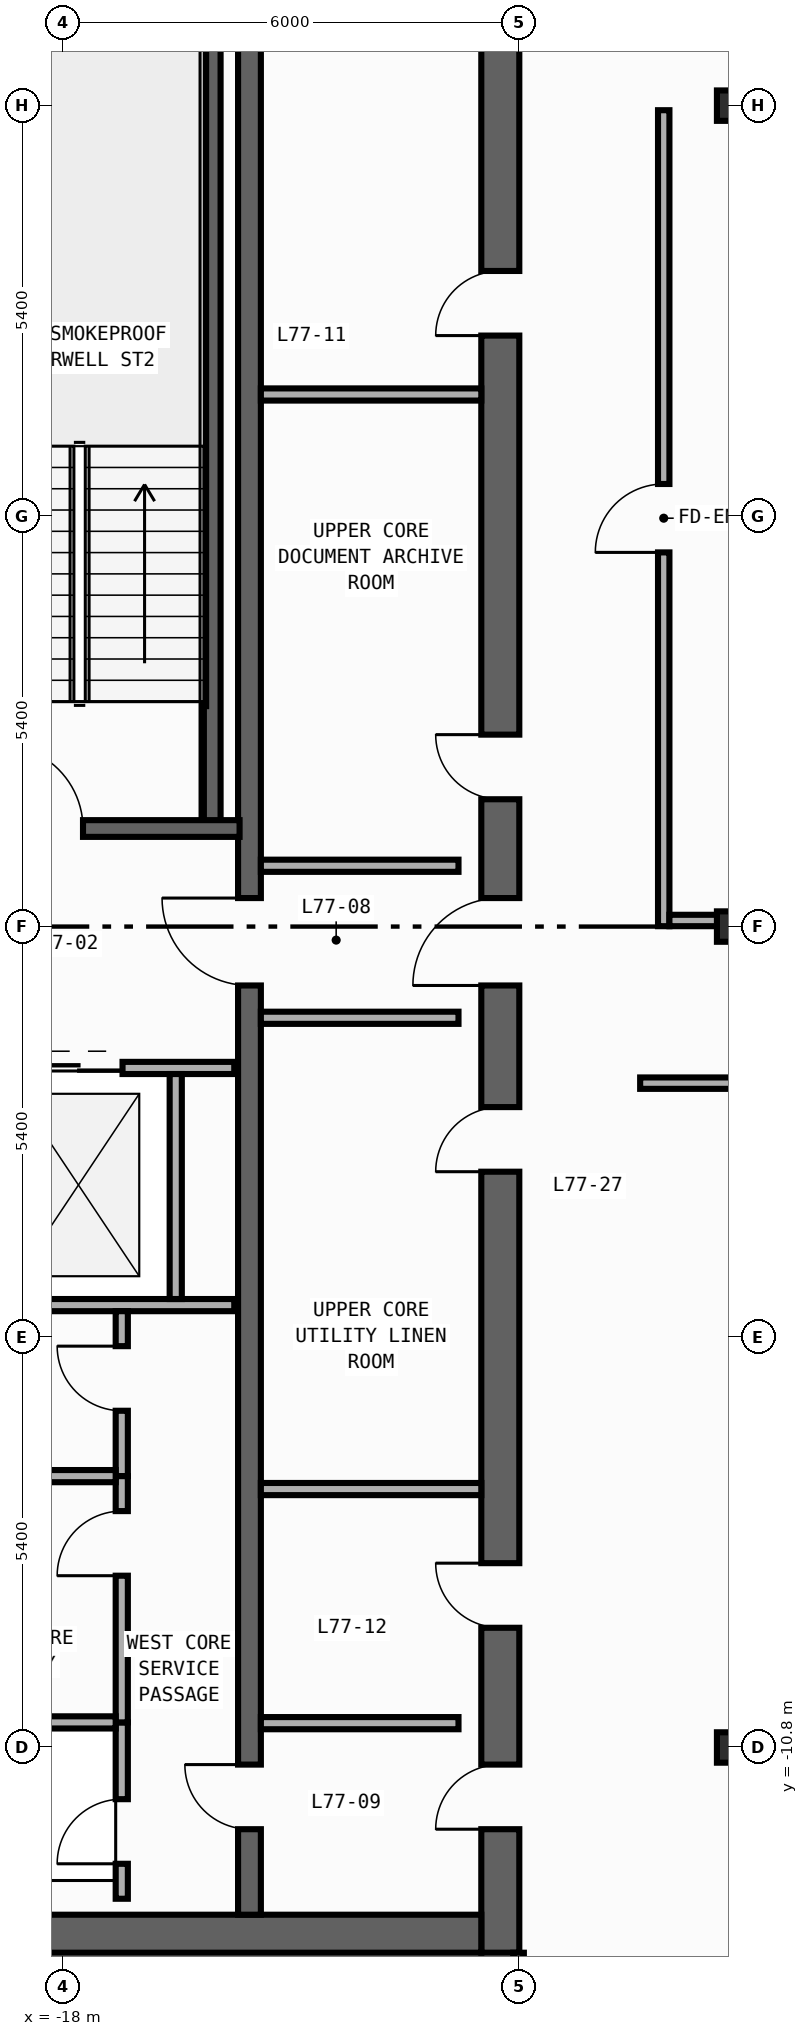
"""IFC4 building model, lengths in metres.
Left out: names, types, materials, properties, quantities, classifications, styles, units other than length and angle.
Written with IfcOpenShell. Run it as: python <this file> out.ifc"""

import sys

from ifc_helpers import new_model, si_unit, direction, frame, frame_2d, origin, origin_2d, place, context, subcontext, project, spatial, rectangle, i_section, extrude, element, fill, save


model = new_model("IFC4")
c1 = context("Model", 3, precision=1e-05, world=origin(), true_north=direction((0.0, 1.0)))
c2 = subcontext(c1, "Body", "Model", "MODEL_VIEW")
j1 = project(units=[si_unit("LENGTHUNIT", "METRE"), si_unit("PLANEANGLEUNIT", "RADIAN")], contexts=[c1])
p1 = place(None, origin())
s1 = spatial("IfcSite", under=j1, at=p1, CompositionType="ELEMENT")
p2 = place(p1, origin())
s2 = spatial("IfcBuilding", under=s1, at=p2, CompositionType="ELEMENT")
p3 = place(p2, frame((0.0, 0.0, 320.4)))
s3 = spatial("IfcBuildingStorey", under=s2, at=p3, CompositionType="ELEMENT", Elevation=320.4)
p4 = place(p3, frame((-12.25, -13.5, 0.0), z_axis=(0.0, 0.0, 1.0), x_axis=(0.0, 1.0, 0.0)))
e1 = element("IfcWall", 1, at=p4, inside=s3, PredefinedType="SHEAR", context=c2, shape_type="SweptSolid", body=[
    extrude(rectangle(XDim=27.0, YDim=0.5, at=frame_2d((13.5, 0.0))), origin(), (0.0, 0.0, 1.0), 4.45),
])
p5 = place(p4, frame((15.175, 0.0, 0.0)))
e2 = element("IfcOpeningElement", 2, at=p5, cuts=e1, PredefinedType="OPENING", context=c2, shape_type="SweptSolid", body=[
    extrude(rectangle(XDim=0.85, YDim=2.1, at=frame_2d((0.425, 1.05))), frame((0.0, 0.26, 0.0), z_axis=(0.0, -1.0, 0.0), x_axis=(1.0, 0.0, 0.0)), (0.0, 0.0, 1.0), 0.52),
])
p6 = place(p4, frame((21.275, 0.0, 0.0)))
e3 = element("IfcOpeningElement", 3, at=p6, cuts=e1, PredefinedType="OPENING", context=c2, shape_type="SweptSolid", body=[
    extrude(rectangle(XDim=0.85, YDim=2.1, at=frame_2d((0.425, 1.05))), frame((0.0, 0.26, 0.0), z_axis=(0.0, -1.0, 0.0), x_axis=(1.0, 0.0, 0.0)), (0.0, 0.0, 1.0), 0.52),
])
p7 = place(p4, frame((4.275, 0.0, 0.0)))
e4 = element("IfcOpeningElement", 4, at=p7, cuts=e1, PredefinedType="OPENING", context=c2, shape_type="SweptSolid", body=[
    extrude(rectangle(XDim=0.85, YDim=2.1, at=frame_2d((0.425, 1.05))), frame((0.0, 0.26, 0.0), z_axis=(0.0, -1.0, 0.0), x_axis=(1.0, 0.0, 0.0)), (0.0, 0.0, 1.0), 0.52),
])
p8 = place(p4, frame((10.275, 0.0, 0.0)))
e5 = element("IfcOpeningElement", 5, at=p8, cuts=e1, PredefinedType="OPENING", context=c2, shape_type="SweptSolid", body=[
    extrude(rectangle(XDim=0.85, YDim=2.1, at=frame_2d((0.425, 1.05))), frame((0.0, 0.26, 0.0), z_axis=(0.0, -1.0, 0.0), x_axis=(1.0, 0.0, 0.0)), (0.0, 0.0, 1.0), 0.52),
])
p9 = place(p4, frame((12.725, 0.0, 0.0)))
e6 = element("IfcOpeningElement", 6, at=p9, cuts=e1, PredefinedType="OPENING", context=c2, shape_type="SweptSolid", body=[
    extrude(rectangle(XDim=1.15, YDim=2.2, at=frame_2d((0.575, 1.1))), frame((0.0, 0.26, 0.0), z_axis=(0.0, -1.0, 0.0), x_axis=(1.0, 0.0, 0.0)), (0.0, 0.0, 1.0), 0.52),
])
p10 = place(p4, frame((1.625, 0.0, 0.0)))
e7 = element("IfcOpeningElement", 7, at=p10, cuts=e1, PredefinedType="OPENING", context=c2, shape_type="SweptSolid", body=[
    extrude(rectangle(XDim=0.85, YDim=2.1, at=frame_2d((0.425, 1.05))), frame((0.0, 0.26, 0.0), z_axis=(0.0, -1.0, 0.0), x_axis=(1.0, 0.0, 0.0)), (0.0, 0.0, 1.0), 0.52),
])
p11 = place(p3, frame((-19.9, -13.25, 0.0), z_axis=(0.0, 0.0, 1.0), x_axis=(1.0, 0.0, 0.0)))
e8 = element("IfcWall", 8, at=p11, inside=s3, PredefinedType="SHEAR", context=c2, shape_type="SweptSolid", body=[
    extrude(rectangle(XDim=7.4, YDim=0.5, at=frame_2d((3.7, 0.0))), origin(), (0.0, 0.0, 1.0), 4.45),
])
p12 = place(p3, frame((-15.55, -13.0, 0.0), z_axis=(0.0, 0.0, 1.0), x_axis=(0.0, 1.0, 0.0)))
e9 = element("IfcWall", 9, at=p12, inside=s3, PredefinedType="SHEAR", context=c2, shape_type="SweptSolid", body=[
    extrude(rectangle(XDim=26.0, YDim=0.3, at=frame_2d((13.0, 0.0))), origin(), (0.0, 0.0, 1.0), 4.45),
])
p13 = place(p12, frame((12.225, 0.0, 0.0)))
e10 = element("IfcOpeningElement", 10, at=p13, cuts=e9, PredefinedType="OPENING", context=c2, shape_type="SweptSolid", body=[
    extrude(rectangle(XDim=1.15, YDim=2.2, at=frame_2d((0.575, 1.1))), frame((0.0, 0.16, 0.0), z_axis=(0.0, -1.0, 0.0), x_axis=(1.0, 0.0, 0.0)), (0.0, 0.0, 1.0), 0.32),
])
p14 = place(p12, frame((1.125, 0.0, 0.0)))
e11 = element("IfcOpeningElement", 11, at=p14, cuts=e9, PredefinedType="OPENING", context=c2, shape_type="SweptSolid", body=[
    extrude(rectangle(XDim=0.85, YDim=2.1, at=frame_2d((0.425, 1.05))), frame((0.0, 0.16, 0.0), z_axis=(0.0, -1.0, 0.0), x_axis=(1.0, 0.0, 0.0)), (0.0, 0.0, 1.0), 0.32),
])
p15 = place(p3, frame((-16.04, 1.29, 0.0), z_axis=(0.0, 0.0, 1.0), x_axis=(0.0, 1.0, 0.0)))
e12 = element("IfcWall", 12, at=p15, inside=s3, PredefinedType="SHEAR", context=c2, shape_type="SweptSolid", body=[
    extrude(rectangle(XDim=11.42, YDim=0.22, at=frame_2d((5.71, 0.0))), origin(), (0.0, 0.0, 1.0), 4.45),
])
p16 = place(p3, frame((-19.92, 1.29, 0.0), z_axis=(0.0, 0.0, 1.0), x_axis=(1.0, 0.0, 0.0)))
e13 = element("IfcWall", 13, at=p16, inside=s3, PredefinedType="SHEAR", context=c2, shape_type="SweptSolid", body=[
    extrude(rectangle(XDim=4.24, YDim=0.22, at=frame_2d((2.12, 0.0))), origin(), (0.0, 0.0, 1.0), 4.45),
])
p17 = place(p16, frame((1.08, 0.0, 0.0)))
e14 = element("IfcOpeningElement", 14, at=p17, cuts=e13, PredefinedType="OPENING", context=c2, shape_type="SweptSolid", body=[
    extrude(rectangle(XDim=1.1, YDim=2.2, at=frame_2d((0.55, 1.1))), frame((0.0, 0.12, 0.0), z_axis=(0.0, -1.0, 0.0), x_axis=(1.0, 0.0, 0.0)), (0.0, 0.0, 1.0), 0.24),
])
for number, where, z_axis, x_axis in (
    (15, (-9.2, -10.8, 0.0), (0.0, 0.0, 1.0), (1.0, 0.0, 0.0)),
    (16, (-9.2, 0.0, 0.0), (0.0, 0.0, 1.0), (1.0, 0.0, 0.0)),
    (17, (-9.2, 10.8, 0.0), (0.0, 0.0, 1.0), (1.0, 0.0, 0.0)),
):
    element("IfcColumn", number, at=place(p3, frame(where, z_axis=z_axis, x_axis=x_axis)), inside=s3, PredefinedType="COLUMN", context=c2, shape_type="SweptSolid", body=[
        extrude(i_section(OverallWidth=0.4, OverallDepth=0.4, WebThickness=0.013, FlangeThickness=0.021, FilletRadius=0.022, at=origin_2d()), origin(), (0.0, 0.0, 1.0), 4.8),
    ])
p18 = place(p3, frame((-19.55, -1.86, 0.0), z_axis=(0.0, 0.0, 1.0), x_axis=(1.0, 0.0, 0.0)))
e18 = element("IfcWall", 18, at=p18, inside=s3, PredefinedType="STANDARD", context=c2, shape_type="SweptSolid", body=[
    extrude(rectangle(XDim=3.8, YDim=0.16, at=frame_2d((1.9, 0.0))), origin(), (0.0, 0.0, 1.0), 4.45),
])
p19 = place(p18, frame((1.18, 0.0, 0.0)))
e19 = element("IfcOpeningElement", 19, at=p19, cuts=e18, PredefinedType="OPENING", context=c2, shape_type="SweptSolid", body=[
    extrude(rectangle(XDim=1.15, YDim=2.2, at=frame_2d((0.575, 1.1))), frame((0.0, 0.09, 0.0), z_axis=(0.0, -1.0, 0.0), x_axis=(1.0, 0.0, 0.0)), (0.0, 0.0, 1.0), 0.18),
])
p20 = place(p3, frame((-19.55, -4.98, 0.0), z_axis=(0.0, 0.0, 1.0), x_axis=(1.0, 0.0, 0.0)))
e20 = element("IfcWall", 20, at=p20, inside=s3, PredefinedType="STANDARD", context=c2, shape_type="SweptSolid", body=[
    extrude(rectangle(XDim=3.8, YDim=0.16, at=frame_2d((1.9, 0.0))), origin(), (0.0, 0.0, 1.0), 4.45),
])
p21 = place(p3, frame((-16.52, -4.9, 0.0), z_axis=(0.0, 0.0, 1.0), x_axis=(0.0, 1.0, 0.0)))
e21 = element("IfcWall", 21, at=p21, inside=s3, PredefinedType="STANDARD", context=c2, shape_type="SweptSolid", body=[
    extrude(rectangle(XDim=2.96, YDim=0.16, at=frame_2d((1.48, 0.0))), origin(), (0.0, 0.0, 1.0), 4.45),
])
for number, where, z_axis, x_axis in (
    (22, (-15.4, 0.8, 0.0), (0.0, 0.0, 1.0), (1.0, 0.0, 0.0)),
    (23, (-15.4, -1.2, 0.0), (0.0, 0.0, 1.0), (1.0, 0.0, 0.0)),
    (24, (-15.4, -10.48, 0.0), (0.0, 0.0, 1.0), (1.0, 0.0, 0.0)),
):
    element("IfcWall", number, at=place(p3, frame(where, z_axis=z_axis, x_axis=x_axis)), inside=s3, PredefinedType="STANDARD", context=c2, shape_type="SweptSolid", body=[
        extrude(rectangle(XDim=2.6, YDim=0.16, at=frame_2d((1.3, 0.0))), origin(), (0.0, 0.0, 1.0), 4.45),
    ])
p22 = place(p3, frame((-17.23, -12.79, 0.0), z_axis=(0.0, 0.0, 1.0), x_axis=(0.0, 1.0, 0.0)))
e25 = element("IfcWall", 25, at=p22, inside=s3, PredefinedType="PARTITIONING", context=c2, shape_type="SweptSolid", body=[
    extrude(rectangle(XDim=2.32, YDim=0.16, at=frame_2d((1.16, 0.0))), origin(), (0.0, 0.0, 1.0), 4.45),
])
p23 = place(p22, frame((0.46, 0.0, 0.0)))
e26 = element("IfcOpeningElement", 26, at=p23, cuts=e25, PredefinedType="OPENING", context=c2, shape_type="SweptSolid", body=[
    extrude(rectangle(XDim=0.85, YDim=2.1, at=frame_2d((0.425, 1.05))), frame((0.0, 0.09, 0.0), z_axis=(0.0, -1.0, 0.0), x_axis=(1.0, 0.0, 0.0)), (0.0, 0.0, 1.0), 0.18),
])
p24 = place(p3, frame((-17.23, -7.23, 0.0), z_axis=(0.0, 0.0, 1.0), x_axis=(0.0, 1.0, 0.0)))
e27 = element("IfcWall", 27, at=p24, inside=s3, PredefinedType="PARTITIONING", context=c2, shape_type="SweptSolid", body=[
    extrude(rectangle(XDim=2.17, YDim=0.16, at=frame_2d((1.085, 0.0))), origin(), (0.0, 0.0, 1.0), 4.45),
])
p25 = place(p24, frame((0.86, 0.0, 0.0)))
e28 = element("IfcOpeningElement", 28, at=p25, cuts=e27, PredefinedType="OPENING", context=c2, shape_type="SweptSolid", body=[
    extrude(rectangle(XDim=0.85, YDim=2.1, at=frame_2d((0.425, 1.05))), frame((0.0, 0.09, 0.0), z_axis=(0.0, -1.0, 0.0), x_axis=(1.0, 0.0, 0.0)), (0.0, 0.0, 1.0), 0.18),
])
p26 = place(p3, frame((-17.23, -10.47, 0.0), z_axis=(0.0, 0.0, 1.0), x_axis=(0.0, 1.0, 0.0)))
e29 = element("IfcWall", 29, at=p26, inside=s3, PredefinedType="PARTITIONING", context=c2, shape_type="SweptSolid", body=[
    extrude(rectangle(XDim=3.24, YDim=0.16, at=frame_2d((1.62, 0.0))), origin(), (0.0, 0.0, 1.0), 4.45),
])
p27 = place(p26, frame((1.93, 0.0, 0.0)))
e30 = element("IfcOpeningElement", 30, at=p27, cuts=e29, PredefinedType="OPENING", context=c2, shape_type="SweptSolid", body=[
    extrude(rectangle(XDim=0.85, YDim=2.1, at=frame_2d((0.425, 1.05))), frame((0.0, 0.09, 0.0), z_axis=(0.0, -1.0, 0.0), x_axis=(1.0, 0.0, 0.0)), (0.0, 0.0, 1.0), 0.18),
])
p28 = place(p3, frame((-19.75, -10.47, 0.0), z_axis=(0.0, 0.0, 1.0), x_axis=(1.0, 0.0, 0.0)))
e31 = element("IfcWall", 31, at=p28, inside=s3, PredefinedType="PARTITIONING", context=c2, shape_type="SweptSolid", body=[
    extrude(rectangle(XDim=2.44, YDim=0.16, at=frame_2d((1.22, 0.0))), origin(), (0.0, 0.0, 1.0), 4.45),
])
p29 = place(p3, frame((-19.9, -7.23, 0.0), z_axis=(0.0, 0.0, 1.0), x_axis=(1.0, 0.0, 0.0)))
e32 = element("IfcWall", 32, at=p29, inside=s3, PredefinedType="PARTITIONING", context=c2, shape_type="SweptSolid", body=[
    extrude(rectangle(XDim=2.59, YDim=0.16, at=frame_2d((1.295, 0.0))), origin(), (0.0, 0.0, 1.0), 4.45),
])
for number, where, z_axis, x_axis in (
    (33, (-15.4, 7.0, 0.0), (0.0, 0.0, 1.0), (1.0, 0.0, 0.0)),
    (34, (-15.4, -7.4, 0.0), (0.0, 0.0, 1.0), (1.0, 0.0, 0.0)),
):
    element("IfcWall", number, at=place(p3, frame(where, z_axis=z_axis, x_axis=x_axis)), inside=s3, PredefinedType="PARTITIONING", context=c2, shape_type="SweptSolid", body=[
        extrude(rectangle(XDim=2.9, YDim=0.16, at=frame_2d((1.45, 0.0))), origin(), (0.0, 0.0, 1.0), 4.45),
    ])
p30 = place(p3, frame((-10.1, 0.005, 0.0), z_axis=(0.0, 0.0, 1.0), x_axis=(0.0, 1.0, 0.0)))
e35 = element("IfcWall", 35, at=p30, inside=s3, PredefinedType="PARTITIONING", context=c2, shape_type="SweptSolid", body=[
    extrude(rectangle(XDim=10.735, YDim=0.15, at=frame_2d((5.368, 0.0))), origin(), (0.0, 0.0, 1.0), 4.45),
])
p31 = place(p30, frame((4.917, 0.0, 0.0)))
e36 = element("IfcOpeningElement", 36, at=p31, cuts=e35, PredefinedType="OPENING", context=c2, shape_type="SweptSolid", body=[
    extrude(rectangle(XDim=0.9, YDim=2.15, at=frame_2d((0.45, 1.075))), frame((0.0, 0.085, 0.0), z_axis=(0.0, -1.0, 0.0), x_axis=(1.0, 0.0, 0.0)), (0.0, 0.0, 1.0), 0.17),
])
p32 = place(p3, frame((-10.41, -2.06, 0.0), z_axis=(0.0, 0.0, 1.0), x_axis=(1.0, 0.0, 0.0)))
e37 = element("IfcWall", 37, at=p32, inside=s3, PredefinedType="PARTITIONING", context=c2, shape_type="SweptSolid", body=[
    extrude(rectangle(XDim=20.82, YDim=0.15, at=frame_2d((10.41, 0.0))), origin(), (0.0, 0.0, 1.0), 4.45),
])
p33 = place(p32, frame((9.86, 0.0, 0.0)))
e38 = element("IfcOpeningElement", 38, at=p33, cuts=e37, PredefinedType="OPENING", context=c2, shape_type="SweptSolid", body=[
    extrude(rectangle(XDim=0.9, YDim=2.15, at=frame_2d((0.45, 1.075))), frame((0.0, 0.085, 0.0), z_axis=(0.0, -1.0, 0.0), x_axis=(1.0, 0.0, 0.0)), (0.0, 0.0, 1.0), 0.17),
])
p34 = place(p3, frame((-10.025, 0.08, 0.0), z_axis=(0.0, 0.0, 1.0), x_axis=(1.0, 0.0, 0.0)))
e39 = element("IfcWall", 39, at=p34, inside=s3, PredefinedType="PARTITIONING", context=c2, shape_type="SweptSolid", body=[
    extrude(rectangle(XDim=8.625, YDim=0.15, at=frame_2d((4.312, 0.0))), origin(), (0.0, 0.0, 1.0), 3.55),
])
p35 = place(p34, frame((7.265, 0.0, 0.0)))
e40 = element("IfcOpeningElement", 40, at=p35, cuts=e39, PredefinedType="OPENING", context=c2, shape_type="SweptSolid", body=[
    extrude(rectangle(XDim=0.9, YDim=2.15, at=frame_2d((0.45, 1.075))), frame((0.0, 0.085, 0.0), z_axis=(0.0, -1.0, 0.0), x_axis=(1.0, 0.0, 0.0)), (0.0, 0.0, 1.0), 0.17),
])
p36 = place(p3, frame((-12.01, -19.755, 0.0), z_axis=(0.0, 0.0, 1.0), x_axis=(0.0, 1.0, 0.0)))
e41 = element("IfcWall", 41, at=p36, inside=s3, PredefinedType="PARTITIONING", context=c2, shape_type="SweptSolid", body=[
    extrude(rectangle(XDim=6.255, YDim=0.14, at=frame_2d((3.127, 0.0))), origin(), (0.0, 0.0, 1.0), 4.45),
])
p37 = place(p36, frame((4.945, 0.0, 0.0)))
e42 = element("IfcOpeningElement", 42, at=p37, cuts=e41, PredefinedType="OPENING", context=c2, shape_type="SweptSolid", body=[
    extrude(rectangle(XDim=0.85, YDim=2.1, at=frame_2d((0.425, 1.05))), frame((0.0, 0.08, 0.0), z_axis=(0.0, -1.0, 0.0), x_axis=(1.0, 0.0, 0.0)), (0.0, 0.0, 1.0), 0.16),
])
p38 = place(p17, origin())
e43 = element("IfcDoor", 43, at=p38, inside=s3, OperationType="SINGLE_SWING_LEFT", PredefinedType="DOOR", context=c2, shape_type="SweptSolid", body=[
    extrude(rectangle(XDim=1.1, YDim=2.2, at=frame_2d((0.55, 1.1))), frame((0.0, 0.025, 0.0), z_axis=(0.0, -1.0, 0.0), x_axis=(1.0, 0.0, 0.0)), (0.0, 0.0, 1.0), 0.05),
])
fill(e14, e43)
p39 = place(p5, origin())
e44 = element("IfcDoor", 44, at=p39, inside=s3, OperationType="SINGLE_SWING_RIGHT", PredefinedType="DOOR", context=c2, shape_type="SweptSolid", body=[
    extrude(rectangle(XDim=0.85, YDim=2.1, at=frame_2d((0.425, 1.05))), frame((0.0, 0.025, 0.0), z_axis=(0.0, -1.0, 0.0), x_axis=(1.0, 0.0, 0.0)), (0.0, 0.0, 1.0), 0.05),
])
fill(e2, e44)
p40 = place(p6, origin())
e45 = element("IfcDoor", 45, at=p40, inside=s3, OperationType="SINGLE_SWING_LEFT", PredefinedType="DOOR", context=c2, shape_type="SweptSolid", body=[
    extrude(rectangle(XDim=0.85, YDim=2.1, at=frame_2d((0.425, 1.05))), frame((0.0, 0.025, 0.0), z_axis=(0.0, -1.0, 0.0), x_axis=(1.0, 0.0, 0.0)), (0.0, 0.0, 1.0), 0.05),
])
fill(e3, e45)
p41 = place(p7, origin())
e46 = element("IfcDoor", 46, at=p41, inside=s3, OperationType="SINGLE_SWING_RIGHT", PredefinedType="DOOR", context=c2, shape_type="SweptSolid", body=[
    extrude(rectangle(XDim=0.85, YDim=2.1, at=frame_2d((0.425, 1.05))), frame((0.0, 0.025, 0.0), z_axis=(0.0, -1.0, 0.0), x_axis=(1.0, 0.0, 0.0)), (0.0, 0.0, 1.0), 0.05),
])
fill(e4, e46)
p42 = place(p8, origin())
e47 = element("IfcDoor", 47, at=p42, inside=s3, OperationType="SINGLE_SWING_LEFT", PredefinedType="DOOR", context=c2, shape_type="SweptSolid", body=[
    extrude(rectangle(XDim=0.85, YDim=2.1, at=frame_2d((0.425, 1.05))), frame((0.0, 0.025, 0.0), z_axis=(0.0, -1.0, 0.0), x_axis=(1.0, 0.0, 0.0)), (0.0, 0.0, 1.0), 0.05),
])
fill(e5, e47)
p43 = place(p9, origin())
e48 = element("IfcDoor", 48, at=p43, inside=s3, OperationType="SINGLE_SWING_LEFT", PredefinedType="DOOR", context=c2, shape_type="SweptSolid", body=[
    extrude(rectangle(XDim=1.15, YDim=2.2, at=frame_2d((0.575, 1.1))), frame((0.0, 0.025, 0.0), z_axis=(0.0, -1.0, 0.0), x_axis=(1.0, 0.0, 0.0)), (0.0, 0.0, 1.0), 0.05),
])
fill(e6, e48)
p44 = place(p13, origin())
e49 = element("IfcDoor", 49, at=p44, inside=s3, OperationType="SINGLE_SWING_RIGHT", PredefinedType="DOOR", context=c2, shape_type="SweptSolid", body=[
    extrude(rectangle(XDim=1.15, YDim=2.2, at=frame_2d((0.575, 1.1))), frame((0.0, 0.025, 0.0), z_axis=(0.0, -1.0, 0.0), x_axis=(1.0, 0.0, 0.0)), (0.0, 0.0, 1.0), 0.05),
])
fill(e10, e49)
p45 = place(p10, origin())
e50 = element("IfcDoor", 50, at=p45, inside=s3, OperationType="SINGLE_SWING_LEFT", PredefinedType="DOOR", context=c2, shape_type="SweptSolid", body=[
    extrude(rectangle(XDim=0.85, YDim=2.1, at=frame_2d((0.425, 1.05))), frame((0.0, 0.025, 0.0), z_axis=(0.0, -1.0, 0.0), x_axis=(1.0, 0.0, 0.0)), (0.0, 0.0, 1.0), 0.05),
])
fill(e7, e50)
p46 = place(p14, origin())
e51 = element("IfcDoor", 51, at=p46, inside=s3, OperationType="SINGLE_SWING_RIGHT", PredefinedType="DOOR", context=c2, shape_type="SweptSolid", body=[
    extrude(rectangle(XDim=0.85, YDim=2.1, at=frame_2d((0.425, 1.05))), frame((0.0, 0.025, 0.0), z_axis=(0.0, -1.0, 0.0), x_axis=(1.0, 0.0, 0.0)), (0.0, 0.0, 1.0), 0.05),
])
fill(e11, e51)
p47 = place(p19, origin())
e52 = element("IfcDoor", 52, at=p47, inside=s3, OperationType="DOUBLE_DOOR_SLIDING", PredefinedType="DOOR", context=c2, shape_type="SweptSolid", body=[
    extrude(rectangle(XDim=1.15, YDim=2.2, at=frame_2d((0.575, 1.1))), frame((0.0, 0.025, 0.0), z_axis=(0.0, -1.0, 0.0), x_axis=(1.0, 0.0, 0.0)), (0.0, 0.0, 1.0), 0.05),
])
fill(e19, e52)
p48 = place(p23, origin())
e53 = element("IfcDoor", 53, at=p48, inside=s3, OperationType="SINGLE_SWING_LEFT", PredefinedType="DOOR", context=c2, shape_type="SweptSolid", body=[
    extrude(rectangle(XDim=0.85, YDim=2.1, at=frame_2d((0.425, 1.05))), frame((0.0, 0.025, 0.0), z_axis=(0.0, -1.0, 0.0), x_axis=(1.0, 0.0, 0.0)), (0.0, 0.0, 1.0), 0.05),
])
fill(e26, e53)
p49 = place(p25, origin())
e54 = element("IfcDoor", 54, at=p49, inside=s3, OperationType="SINGLE_SWING_RIGHT", PredefinedType="DOOR", context=c2, shape_type="SweptSolid", body=[
    extrude(rectangle(XDim=0.85, YDim=2.1, at=frame_2d((0.425, 1.05))), frame((0.0, 0.025, 0.0), z_axis=(0.0, -1.0, 0.0), x_axis=(1.0, 0.0, 0.0)), (0.0, 0.0, 1.0), 0.05),
])
fill(e28, e54)
p50 = place(p27, origin())
e55 = element("IfcDoor", 55, at=p50, inside=s3, OperationType="SINGLE_SWING_LEFT", PredefinedType="DOOR", context=c2, shape_type="SweptSolid", body=[
    extrude(rectangle(XDim=0.85, YDim=2.1, at=frame_2d((0.425, 1.05))), frame((0.0, 0.025, 0.0), z_axis=(0.0, -1.0, 0.0), x_axis=(1.0, 0.0, 0.0)), (0.0, 0.0, 1.0), 0.05),
])
fill(e30, e55)
p51 = place(p31, origin())
e56 = element("IfcDoor", 56, at=p51, inside=s3, OperationType="SINGLE_SWING_LEFT", PredefinedType="DOOR", context=c2, shape_type="SweptSolid", body=[
    extrude(rectangle(XDim=0.9, YDim=2.15, at=frame_2d((0.45, 1.075))), frame((0.0, 0.025, 0.0), z_axis=(0.0, -1.0, 0.0), x_axis=(1.0, 0.0, 0.0)), (0.0, 0.0, 1.0), 0.05),
])
fill(e36, e56)
save(model, sys.argv[1])
